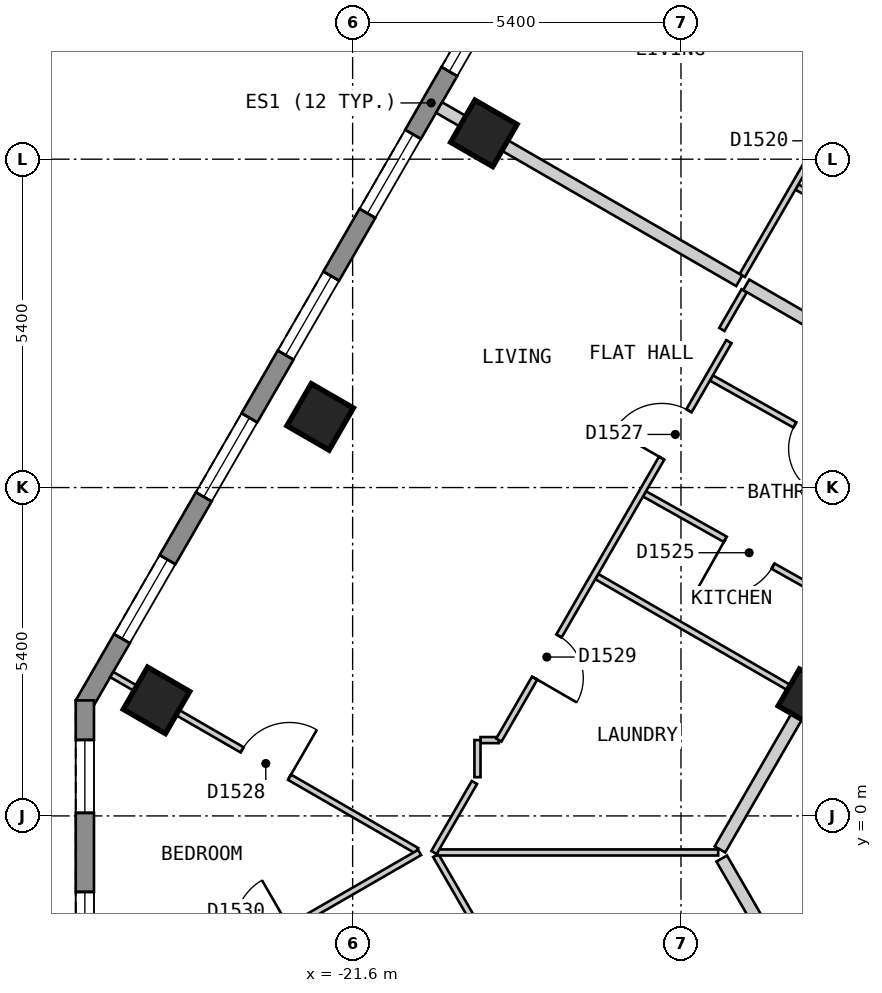
"""IFC4 building model, lengths in metres.
Left out: names, types, materials, properties, quantities, classifications, styles, units other than length and angle.
Written with IfcOpenShell. Run it as: python <this file> out.ifc"""

import sys

from ifc_helpers import new_model, si_unit, direction, frame, frame_2d, origin, origin_2d, place, context, subcontext, project, spatial, polyline, rectangle, outline, extrude, element, fill, save


model = new_model("IFC4")
c1 = context("Model", 3, precision=1e-05, world=origin(), true_north=direction((0.0, 1.0)))
c2 = subcontext(c1, "Body", "Model", "MODEL_VIEW")
j1 = project(units=[si_unit("LENGTHUNIT", "METRE"), si_unit("PLANEANGLEUNIT", "RADIAN")], contexts=[c1])
p1 = place(None, origin())
s1 = spatial("IfcSite", under=j1, at=p1, CompositionType="ELEMENT")
p2 = place(p1, origin())
s2 = spatial("IfcBuilding", under=s1, at=p2, CompositionType="ELEMENT")
p3 = place(p2, frame((0.0, 0.0, 184.2)))
s3 = spatial("IfcBuildingStorey", under=s2, at=p3, CompositionType="ELEMENT", Elevation=184.2)
for number, where, z_axis, x_axis in (
    (1, (-19.442, 11.225, 0.0), (0.0, 0.0, 1.0), (-0.5, -0.866, 0.0)),
    (2, (-22.134, 6.562, 0.0), (0.0, 0.0, 1.0), (-0.5, -0.866, 0.0)),
    (3, (-24.826, 1.9, 0.0), (0.0, 0.0, 1.0), (-0.5, -0.866, 0.0)),
):
    element("IfcColumn", number, at=place(p3, frame(where, z_axis=z_axis, x_axis=x_axis)), inside=s3, PredefinedType="COLUMN", context=c2, shape_type="SweptSolid", body=[
        extrude(rectangle(XDim=0.8, YDim=0.8, at=origin_2d()), origin(), (0.0, 0.0, 1.0), 3.0),
    ])
p4 = place(p3, frame((-14.123, 1.937, 0.0), z_axis=(0.0, 0.0, 1.0), x_axis=(-0.5, -0.866025403784, 0.0)))
e4 = element("IfcColumn", 4, at=p4, inside=s3, PredefinedType="COLUMN", context=c2, shape_type="SweptSolid", body=[
    extrude(rectangle(XDim=0.7, YDim=0.7, at=origin_2d()), origin(), (0.0, 0.0, 1.0), 3.0),
])
p5 = place(p3, frame((-14.592, 21.625, 0.0), z_axis=(0.0, 0.0, 1.0), x_axis=(-0.500010537973, -0.866019319597, 0.0)))
e5 = element("IfcWall", 5, at=p5, inside=s3, PredefinedType="SOLIDWALL", context=c2, shape_type="SweptSolid", body=[
    extrude(outline(polyline([(0.0, -0.15), (22.863, -0.15), (22.783, 0.15), (0.08, 0.15), (0.0, -0.15)])), origin(), (0.0, 0.0, 1.0), 2.7),
])
p6 = place(p5, frame((1.259, 0.0, 0.15)))
e6 = element("IfcOpeningElement", 6, at=p6, cuts=e5, PredefinedType="OPENING", context=c2, shape_type="SweptSolid", body=[
    extrude(rectangle(XDim=1.5, YDim=2.1, at=frame_2d((0.75, 1.05))), frame((0.0, 0.16, 0.0), z_axis=(0.0, -1.0, 0.0), x_axis=(1.0, 0.0, 0.0)), (0.0, 0.0, 1.0), 0.32),
])
p7 = place(p5, frame((3.952, 0.0, 0.15)))
e7 = element("IfcOpeningElement", 7, at=p7, cuts=e5, PredefinedType="OPENING", context=c2, shape_type="SweptSolid", body=[
    extrude(rectangle(XDim=1.5, YDim=2.1, at=frame_2d((0.75, 1.05))), frame((0.0, 0.16, 0.0), z_axis=(0.0, -1.0, 0.0), x_axis=(1.0, 0.0, 0.0)), (0.0, 0.0, 1.0), 0.32),
])
p8 = place(p5, frame((6.644, 0.0, 0.15)))
e8 = element("IfcOpeningElement", 8, at=p8, cuts=e5, PredefinedType="OPENING", context=c2, shape_type="SweptSolid", body=[
    extrude(rectangle(XDim=1.5, YDim=2.1, at=frame_2d((0.75, 1.05))), frame((0.0, 0.16, 0.0), z_axis=(0.0, -1.0, 0.0), x_axis=(1.0, 0.0, 0.0)), (0.0, 0.0, 1.0), 0.32),
])
p9 = place(p5, frame((9.335, 0.0, 0.15)))
e9 = element("IfcOpeningElement", 9, at=p9, cuts=e5, PredefinedType="OPENING", context=c2, shape_type="SweptSolid", body=[
    extrude(rectangle(XDim=1.5, YDim=2.1, at=frame_2d((0.75, 1.05))), frame((0.0, 0.16, 0.0), z_axis=(0.0, -1.0, 0.0), x_axis=(1.0, 0.0, 0.0)), (0.0, 0.0, 1.0), 0.32),
])
p10 = place(p5, frame((12.028, 0.0, 0.15)))
e10 = element("IfcOpeningElement", 10, at=p10, cuts=e5, PredefinedType="OPENING", context=c2, shape_type="SweptSolid", body=[
    extrude(rectangle(XDim=1.5, YDim=2.1, at=frame_2d((0.75, 1.05))), frame((0.0, 0.16, 0.0), z_axis=(0.0, -1.0, 0.0), x_axis=(1.0, 0.0, 0.0)), (0.0, 0.0, 1.0), 0.32),
])
p11 = place(p5, frame((14.72, 0.0, 0.15)))
e11 = element("IfcOpeningElement", 11, at=p11, cuts=e5, PredefinedType="OPENING", context=c2, shape_type="SweptSolid", body=[
    extrude(rectangle(XDim=1.5, YDim=2.1, at=frame_2d((0.75, 1.05))), frame((0.0, 0.16, 0.0), z_axis=(0.0, -1.0, 0.0), x_axis=(1.0, 0.0, 0.0)), (0.0, 0.0, 1.0), 0.32),
])
p12 = place(p5, frame((17.411, 0.0, 0.15)))
e12 = element("IfcOpeningElement", 12, at=p12, cuts=e5, PredefinedType="OPENING", context=c2, shape_type="SweptSolid", body=[
    extrude(rectangle(XDim=1.5, YDim=2.1, at=frame_2d((0.75, 1.05))), frame((0.0, 0.16, 0.0), z_axis=(0.0, -1.0, 0.0), x_axis=(1.0, 0.0, 0.0)), (0.0, 0.0, 1.0), 0.32),
])
p13 = place(p5, frame((20.104, 0.0, 0.15)))
e13 = element("IfcOpeningElement", 13, at=p13, cuts=e5, PredefinedType="OPENING", context=c2, shape_type="SweptSolid", body=[
    extrude(rectangle(XDim=1.5, YDim=2.1, at=frame_2d((0.75, 1.05))), frame((0.0, 0.16, 0.0), z_axis=(0.0, -1.0, 0.0), x_axis=(1.0, 0.0, 0.0)), (0.0, 0.0, 1.0), 0.32),
])
p14 = place(p3, frame((-26.004, 1.9, 0.0), z_axis=(0.0, 0.0, 1.0), x_axis=(0.0, -1.0, 0.0)))
e14 = element("IfcWall", 14, at=p14, inside=s3, PredefinedType="SOLIDWALL", context=c2, shape_type="SweptSolid", body=[
    extrude(outline(polyline([(0.0, -0.15), (5.0, -0.15), (4.92, 0.15), (0.08, 0.15), (0.0, -0.15)])), origin(), (0.0, 0.0, 1.0), 2.7),
])
p15 = place(p14, frame((0.65, 0.0, 0.15)))
e15 = element("IfcOpeningElement", 15, at=p15, cuts=e14, PredefinedType="OPENING", context=c2, shape_type="SweptSolid", body=[
    extrude(rectangle(XDim=1.2, YDim=2.1, at=frame_2d((0.6, 1.05))), frame((0.0, 0.16, 0.0), z_axis=(0.0, -1.0, 0.0), x_axis=(1.0, 0.0, 0.0)), (0.0, 0.0, 1.0), 0.32),
])
p16 = place(p14, frame((3.15, 0.0, 0.15)))
e16 = element("IfcOpeningElement", 16, at=p16, cuts=e14, PredefinedType="OPENING", context=c2, shape_type="SweptSolid", body=[
    extrude(rectangle(XDim=1.2, YDim=2.1, at=frame_2d((0.6, 1.05))), frame((0.0, 0.16, 0.0), z_axis=(0.0, -1.0, 0.0), x_axis=(1.0, 0.0, 0.0)), (0.0, 0.0, 1.0), 0.32),
])
p17 = place(p3, frame((-15.53, -0.701, 0.0), z_axis=(0.0, 0.0, 1.0), x_axis=(0.499972710878, -0.866041158593, 0.0)))
e17 = element("IfcWall", 17, at=p17, inside=s3, PredefinedType="PARTITIONING", context=c2, shape_type="SweptSolid", body=[
    extrude(rectangle(XDim=2.308, YDim=0.2, at=frame_2d((1.154, 0.0))), origin(), (0.0, 0.0, 1.0), 2.7),
])
p18 = place(p3, frame((-15.559, -0.551, 0.0), z_axis=(0.0, 0.0, 1.0), x_axis=(0.499964997208, 0.866045611713, 0.0)))
e18 = element("IfcWall", 18, at=p18, inside=s3, PredefinedType="PARTITIONING", context=c2, shape_type="SweptSolid", body=[
    extrude(rectangle(XDim=9.643, YDim=0.2, at=frame_2d((4.821, 0.0))), origin(), (0.0, 0.0, 1.0), 2.7),
])
p19 = place(p18, frame((5.088, 0.0, 0.0)))
e19 = element("IfcOpeningElement", 19, at=p19, cuts=e18, PredefinedType="OPENING", context=c2, shape_type="SweptSolid", body=[
    extrude(rectangle(XDim=1.0, YDim=2.1, at=frame_2d((0.5, 1.05))), frame((0.0, 0.11, 0.0), z_axis=(0.0, -1.0, 0.0), x_axis=(1.0, 0.0, 0.0)), (0.0, 0.0, 1.0), 0.22),
])
p20 = place(p3, frame((-20.233, -0.651, 0.0), z_axis=(0.0, 0.0, 1.0), x_axis=(0.500498449207, -0.865737432679, 0.0)))
e20 = element("IfcWall", 20, at=p20, inside=s3, PredefinedType="PARTITIONING", context=c2, shape_type="SweptSolid", body=[
    extrude(rectangle(XDim=1.271, YDim=0.1, at=frame_2d((0.635, 0.0))), origin(), (0.0, 0.0, 1.0), 2.7),
])
p21 = place(p3, frame((-14.294, 10.342, 0.0), z_axis=(0.0, 0.0, 1.0), x_axis=(0.873582256032, -0.486676527013, 0.0)))
e21 = element("IfcWall", 21, at=p21, inside=s3, PredefinedType="PARTITIONING", context=c2, shape_type="SweptSolid", body=[
    extrude(rectangle(XDim=4.05, YDim=0.1, at=frame_2d((2.025, 0.0))), origin(), (0.0, 0.0, 1.0), 2.7),
])
p22 = place(p21, frame((1.65, 0.0, 0.0)))
e22 = element("IfcOpeningElement", 22, at=p22, cuts=e21, PredefinedType="OPENING", context=c2, shape_type="SweptSolid", body=[
    extrude(rectangle(XDim=0.8, YDim=2.1, at=frame_2d((0.4, 1.05))), frame((0.0, 0.06, 0.0), z_axis=(0.0, -1.0, 0.0), x_axis=(1.0, 0.0, 0.0)), (0.0, 0.0, 1.0), 0.12),
])
p23 = place(p3, frame((-16.799, 5.296, 0.0), z_axis=(0.0, 0.0, 1.0), x_axis=(0.871565499758, -0.490279083413, 0.0)))
e23 = element("IfcWall", 23, at=p23, inside=s3, PredefinedType="PARTITIONING", context=c2, shape_type="SweptSolid", body=[
    extrude(rectangle(XDim=3.897, YDim=0.1, at=frame_2d((1.949, 0.0))), origin(), (0.0, 0.0, 1.0), 2.7),
])
p24 = place(p23, frame((1.524, 0.0, 0.0)))
e24 = element("IfcOpeningElement", 24, at=p24, cuts=e23, PredefinedType="OPENING", context=c2, shape_type="SweptSolid", body=[
    extrude(rectangle(XDim=0.9, YDim=2.1, at=frame_2d((0.45, 1.05))), frame((0.0, 0.06, 0.0), z_axis=(0.0, -1.0, 0.0), x_axis=(1.0, 0.0, 0.0)), (0.0, 0.0, 1.0), 0.12),
])
p25 = place(p3, frame((-15.699, 7.202, 0.0), z_axis=(0.0, 0.0, 1.0), x_axis=(0.871565499758, -0.490279083413, 0.0)))
e25 = element("IfcWall", 25, at=p25, inside=s3, PredefinedType="PARTITIONING", context=c2, shape_type="SweptSolid", body=[
    extrude(rectangle(XDim=3.897, YDim=0.1, at=frame_2d((1.949, 0.0))), origin(), (0.0, 0.0, 1.0), 2.7),
])
p26 = place(p25, frame((1.574, 0.0, 0.0)))
e26 = element("IfcOpeningElement", 26, at=p26, cuts=e25, PredefinedType="OPENING", context=c2, shape_type="SweptSolid", body=[
    extrude(rectangle(XDim=0.8, YDim=2.1, at=frame_2d((0.4, 1.05))), frame((0.0, 0.06, 0.0), z_axis=(0.0, -1.0, 0.0), x_axis=(1.0, 0.0, 0.0)), (0.0, 0.0, 1.0), 0.12),
])
p27 = place(p3, frame((-17.585, 3.936, 0.0), z_axis=(0.0, 0.0, 1.0), x_axis=(0.865979019114, -0.500080332001, 0.0)))
e27 = element("IfcWall", 27, at=p27, inside=s3, PredefinedType="PARTITIONING", context=c2, shape_type="SweptSolid", body=[
    extrude(rectangle(XDim=3.897, YDim=0.1, at=frame_2d((1.949, 0.0))), origin(), (0.0, 0.0, 1.0), 2.7),
])
p28 = place(p3, frame((-25.562, 2.325, 0.0), z_axis=(0.0, 0.0, 1.0), x_axis=(0.86599890761, -0.500045889912, 0.0)))
e28 = element("IfcWall", 28, at=p28, inside=s3, PredefinedType="PARTITIONING", context=c2, shape_type="SweptSolid", body=[
    extrude(rectangle(XDim=5.793, YDim=0.1, at=frame_2d((2.897, 0.0))), origin(), (0.0, 0.0, 1.0), 2.7),
])
p29 = place(p28, frame((2.476, 0.0, 0.0)))
e29 = element("IfcOpeningElement", 29, at=p29, cuts=e28, PredefinedType="OPENING", context=c2, shape_type="SweptSolid", body=[
    extrude(rectangle(XDim=0.9, YDim=2.1, at=frame_2d((0.45, 1.05))), frame((0.0, 0.06, 0.0), z_axis=(0.0, -1.0, 0.0), x_axis=(1.0, 0.0, 0.0)), (0.0, 0.0, 1.0), 0.12),
])
p30 = place(p3, frame((-20.204, -0.601, 0.0), z_axis=(0.0, 0.0, 1.0), x_axis=(1.0, 0.0, 0.0)))
e30 = element("IfcWall", 30, at=p30, inside=s3, PredefinedType="PARTITIONING", context=c2, shape_type="SweptSolid", body=[
    extrude(rectangle(XDim=4.616, YDim=0.1, at=frame_2d((2.308, 0.0))), origin(), (0.0, 0.0, 1.0), 2.7),
])
p31 = place(p3, frame((-19.497, 1.247, 0.0), z_axis=(0.0, 0.0, 1.0), x_axis=(1.0, 0.0, 0.0)))
e31 = element("IfcWall", 31, at=p31, inside=s3, PredefinedType="PARTITIONING", context=c2, shape_type="SweptSolid", body=[
    extrude(rectangle(XDim=0.302, YDim=0.1, at=frame_2d((0.151, 0.0))), origin(), (0.0, 0.0, 1.0), 2.7),
])
p32 = place(p3, frame((-20.262, -0.601, 0.0), z_axis=(0.0, 0.0, 1.0), x_axis=(0.500247001515, 0.86588275042, 0.0)))
e32 = element("IfcWall", 32, at=p32, inside=s3, PredefinedType="PARTITIONING", context=c2, shape_type="SweptSolid", body=[
    extrude(rectangle(XDim=1.329, YDim=0.1, at=frame_2d((0.665, 0.0))), origin(), (0.0, 0.0, 1.0), 2.7),
])
p33 = place(p3, frame((-19.195, 1.247, 0.0), z_axis=(0.0, 0.0, 1.0), x_axis=(0.499959862915, 0.866048575701, 0.0)))
e33 = element("IfcWall", 33, at=p33, inside=s3, PredefinedType="PARTITIONING", context=c2, shape_type="SweptSolid", body=[
    extrude(rectangle(XDim=7.566, YDim=0.1, at=frame_2d((3.783, 0.0))), origin(), (0.0, 0.0, 1.0), 2.7),
])
p34 = place(p33, frame((5.354, 0.0, 0.0)))
e34 = element("IfcOpeningElement", 34, at=p34, cuts=e33, PredefinedType="OPENING", context=c2, shape_type="SweptSolid", body=[
    extrude(rectangle(XDim=0.9, YDim=2.1, at=frame_2d((0.45, 1.05))), frame((0.0, 0.06, 0.0), z_axis=(0.0, -1.0, 0.0), x_axis=(1.0, 0.0, 0.0)), (0.0, 0.0, 1.0), 0.12),
])
p35 = place(p33, frame((1.177, 0.0, 0.0)))
e35 = element("IfcOpeningElement", 35, at=p35, cuts=e33, PredefinedType="OPENING", context=c2, shape_type="SweptSolid", body=[
    extrude(rectangle(XDim=0.8, YDim=2.1, at=frame_2d((0.4, 1.05))), frame((0.0, 0.06, 0.0), z_axis=(0.0, -1.0, 0.0), x_axis=(1.0, 0.0, 0.0)), (0.0, 0.0, 1.0), 0.12),
])
p36 = place(p3, frame((-15.528, 8.0, 0.0), z_axis=(0.0, 0.0, 1.0), x_axis=(0.500421336976, 0.865782008071, 0.0)))
e36 = element("IfcWall", 36, at=p36, inside=s3, PredefinedType="PARTITIONING", context=c2, shape_type="SweptSolid", body=[
    extrude(rectangle(XDim=0.736, YDim=0.1, at=frame_2d((0.368, 0.0))), origin(), (0.0, 0.0, 1.0), 2.7),
])
p37 = place(p3, frame((-15.192, 8.887, 0.0), z_axis=(0.0, 0.0, 1.0), x_axis=(0.500028204665, 0.866009119201, 0.0)))
e37 = element("IfcWall", 37, at=p37, inside=s3, PredefinedType="PARTITIONING", context=c2, shape_type="SweptSolid", body=[
    extrude(rectangle(XDim=10.667, YDim=0.1, at=frame_2d((5.334, 0.0))), origin(), (0.0, 0.0, 1.0), 2.7),
])
p38 = place(p37, frame((2.108, 0.0, 0.0)))
e38 = element("IfcOpeningElement", 38, at=p38, cuts=e37, PredefinedType="OPENING", context=c2, shape_type="SweptSolid", body=[
    extrude(rectangle(XDim=0.9, YDim=2.1, at=frame_2d((0.45, 1.05))), frame((0.0, 0.06, 0.0), z_axis=(0.0, -1.0, 0.0), x_axis=(1.0, 0.0, 0.0)), (0.0, 0.0, 1.0), 0.12),
])
p39 = place(p37, frame((7.576, 0.0, 0.0)))
e39 = element("IfcOpeningElement", 39, at=p39, cuts=e37, PredefinedType="OPENING", context=c2, shape_type="SweptSolid", body=[
    extrude(rectangle(XDim=0.8, YDim=2.1, at=frame_2d((0.4, 1.05))), frame((0.0, 0.06, 0.0), z_axis=(0.0, -1.0, 0.0), x_axis=(1.0, 0.0, 0.0)), (0.0, 0.0, 1.0), 0.12),
])
p40 = place(p3, frame((-19.547, 0.637, 0.0), z_axis=(0.0, 0.0, 1.0), x_axis=(0.0, 1.0, 0.0)))
e40 = element("IfcWall", 40, at=p40, inside=s3, PredefinedType="PARTITIONING", context=c2, shape_type="SweptSolid", body=[
    extrude(rectangle(XDim=0.61, YDim=0.1, at=frame_2d((0.305, 0.0))), origin(), (0.0, 0.0, 1.0), 2.7),
])
p41 = place(p3, frame((-25.563, -3.524, 0.0), z_axis=(0.0, 0.0, 1.0), x_axis=(0.866128586522, 0.499821239653, 0.0)))
e41 = element("IfcWall", 41, at=p41, inside=s3, PredefinedType="PARTITIONING", context=c2, shape_type="SweptSolid", body=[
    extrude(rectangle(XDim=5.848, YDim=0.1, at=frame_2d((2.924, 0.0))), origin(), (0.0, 0.0, 1.0), 2.7),
])
p42 = place(p41, frame((2.474, 0.0, 0.0)))
e42 = element("IfcOpeningElement", 42, at=p42, cuts=e41, PredefinedType="OPENING", context=c2, shape_type="SweptSolid", body=[
    extrude(rectangle(XDim=0.9, YDim=2.1, at=frame_2d((0.45, 1.05))), frame((0.0, 0.06, 0.0), z_axis=(0.0, -1.0, 0.0), x_axis=(1.0, 0.0, 0.0)), (0.0, 0.0, 1.0), 0.12),
])
p43 = place(p3, frame((-20.178, 11.65, 0.0), z_axis=(0.0, 0.0, 1.0), x_axis=(0.866022950691, -0.500004248858, 0.0)))
e43 = element("IfcWall", 43, at=p43, inside=s3, PredefinedType="PARTITIONING", context=c2, shape_type="SweptSolid", body=[
    extrude(rectangle(XDim=5.7, YDim=0.2, at=frame_2d((2.85, 0.0))), origin(), (0.0, 0.0, 1.0), 2.7),
])
p44 = place(p3, frame((-15.127, 8.734, 0.0), z_axis=(0.0, 0.0, 1.0), x_axis=(0.865984601828, -0.500070664403, 0.0)))
e44 = element("IfcWall", 44, at=p44, inside=s3, PredefinedType="PARTITIONING", context=c2, shape_type="SweptSolid", body=[
    extrude(rectangle(XDim=4.167, YDim=0.2, at=frame_2d((2.084, 0.0))), origin(), (0.0, 0.0, 1.0), 2.7),
])
p45 = place(p9, origin())
e45 = element("IfcWindow", 45, at=p45, inside=s3, PartitioningType="SINGLE_PANEL", PredefinedType="WINDOW", context=c2, shape_type="SweptSolid", body=[
    extrude(rectangle(XDim=1.5, YDim=2.1, at=frame_2d((0.75, 1.05))), frame((0.0, 0.03, 0.0), z_axis=(0.0, -1.0, 0.0), x_axis=(1.0, 0.0, 0.0)), (0.0, 0.0, 1.0), 0.06),
])
fill(e9, e45)
p46 = place(p10, origin())
e46 = element("IfcWindow", 46, at=p46, inside=s3, PartitioningType="SINGLE_PANEL", PredefinedType="WINDOW", context=c2, shape_type="SweptSolid", body=[
    extrude(rectangle(XDim=1.5, YDim=2.1, at=frame_2d((0.75, 1.05))), frame((0.0, 0.03, 0.0), z_axis=(0.0, -1.0, 0.0), x_axis=(1.0, 0.0, 0.0)), (0.0, 0.0, 1.0), 0.06),
])
fill(e10, e46)
p47 = place(p11, origin())
e47 = element("IfcWindow", 47, at=p47, inside=s3, PartitioningType="SINGLE_PANEL", PredefinedType="WINDOW", context=c2, shape_type="SweptSolid", body=[
    extrude(rectangle(XDim=1.5, YDim=2.1, at=frame_2d((0.75, 1.05))), frame((0.0, 0.03, 0.0), z_axis=(0.0, -1.0, 0.0), x_axis=(1.0, 0.0, 0.0)), (0.0, 0.0, 1.0), 0.06),
])
fill(e11, e47)
p48 = place(p12, origin())
e48 = element("IfcWindow", 48, at=p48, inside=s3, PartitioningType="SINGLE_PANEL", PredefinedType="WINDOW", context=c2, shape_type="SweptSolid", body=[
    extrude(rectangle(XDim=1.5, YDim=2.1, at=frame_2d((0.75, 1.05))), frame((0.0, 0.03, 0.0), z_axis=(0.0, -1.0, 0.0), x_axis=(1.0, 0.0, 0.0)), (0.0, 0.0, 1.0), 0.06),
])
fill(e12, e48)
p49 = place(p13, origin())
e49 = element("IfcWindow", 49, at=p49, inside=s3, PartitioningType="SINGLE_PANEL", PredefinedType="WINDOW", context=c2, shape_type="SweptSolid", body=[
    extrude(rectangle(XDim=1.5, YDim=2.1, at=frame_2d((0.75, 1.05))), frame((0.0, 0.03, 0.0), z_axis=(0.0, -1.0, 0.0), x_axis=(1.0, 0.0, 0.0)), (0.0, 0.0, 1.0), 0.06),
])
fill(e13, e49)
p50 = place(p15, origin())
e50 = element("IfcWindow", 50, at=p50, inside=s3, PartitioningType="SINGLE_PANEL", PredefinedType="WINDOW", context=c2, shape_type="SweptSolid", body=[
    extrude(rectangle(XDim=1.2, YDim=2.1, at=frame_2d((0.6, 1.05))), frame((0.0, 0.03, 0.0), z_axis=(0.0, -1.0, 0.0), x_axis=(1.0, 0.0, 0.0)), (0.0, 0.0, 1.0), 0.06),
])
fill(e15, e50)
p51 = place(p16, origin())
e51 = element("IfcWindow", 51, at=p51, inside=s3, PartitioningType="SINGLE_PANEL", PredefinedType="WINDOW", context=c2, shape_type="SweptSolid", body=[
    extrude(rectangle(XDim=1.2, YDim=2.1, at=frame_2d((0.6, 1.05))), frame((0.0, 0.03, 0.0), z_axis=(0.0, -1.0, 0.0), x_axis=(1.0, 0.0, 0.0)), (0.0, 0.0, 1.0), 0.06),
])
fill(e16, e51)
p52 = place(p24, origin())
e52 = element("IfcDoor", 52, at=p52, inside=s3, OperationType="SINGLE_SWING_LEFT", PredefinedType="DOOR", context=c2, shape_type="SweptSolid", body=[
    extrude(rectangle(XDim=0.9, YDim=2.1, at=frame_2d((0.45, 1.05))), frame((0.0, 0.025, 0.0), z_axis=(0.0, -1.0, 0.0), x_axis=(1.0, 0.0, 0.0)), (0.0, 0.0, 1.0), 0.05),
])
fill(e24, e52)
p53 = place(p26, origin())
e53 = element("IfcDoor", 53, at=p53, inside=s3, OperationType="SINGLE_SWING_RIGHT", PredefinedType="DOOR", context=c2, shape_type="SweptSolid", body=[
    extrude(rectangle(XDim=0.8, YDim=2.1, at=frame_2d((0.4, 1.05))), frame((0.0, 0.025, 0.0), z_axis=(0.0, -1.0, 0.0), x_axis=(1.0, 0.0, 0.0)), (0.0, 0.0, 1.0), 0.05),
])
fill(e26, e53)
p54 = place(p34, origin())
e54 = element("IfcDoor", 54, at=p54, inside=s3, OperationType="SINGLE_SWING_LEFT", PredefinedType="DOOR", context=c2, shape_type="SweptSolid", body=[
    extrude(rectangle(XDim=0.9, YDim=2.1, at=frame_2d((0.45, 1.05))), frame((0.0, 0.025, 0.0), z_axis=(0.0, -1.0, 0.0), x_axis=(1.0, 0.0, 0.0)), (0.0, 0.0, 1.0), 0.05),
])
fill(e34, e54)
p55 = place(p29, origin())
e55 = element("IfcDoor", 55, at=p55, inside=s3, OperationType="SINGLE_SWING_RIGHT", PredefinedType="DOOR", context=c2, shape_type="SweptSolid", body=[
    extrude(rectangle(XDim=0.9, YDim=2.1, at=frame_2d((0.45, 1.05))), frame((0.0, 0.025, 0.0), z_axis=(0.0, -1.0, 0.0), x_axis=(1.0, 0.0, 0.0)), (0.0, 0.0, 1.0), 0.05),
])
fill(e29, e55)
p56 = place(p35, origin())
e56 = element("IfcDoor", 56, at=p56, inside=s3, OperationType="SINGLE_SWING_LEFT", PredefinedType="DOOR", context=c2, shape_type="SweptSolid", body=[
    extrude(rectangle(XDim=0.8, YDim=2.1, at=frame_2d((0.4, 1.05))), frame((0.0, 0.025, 0.0), z_axis=(0.0, -1.0, 0.0), x_axis=(1.0, 0.0, 0.0)), (0.0, 0.0, 1.0), 0.05),
])
fill(e35, e56)
save(model, sys.argv[1])
